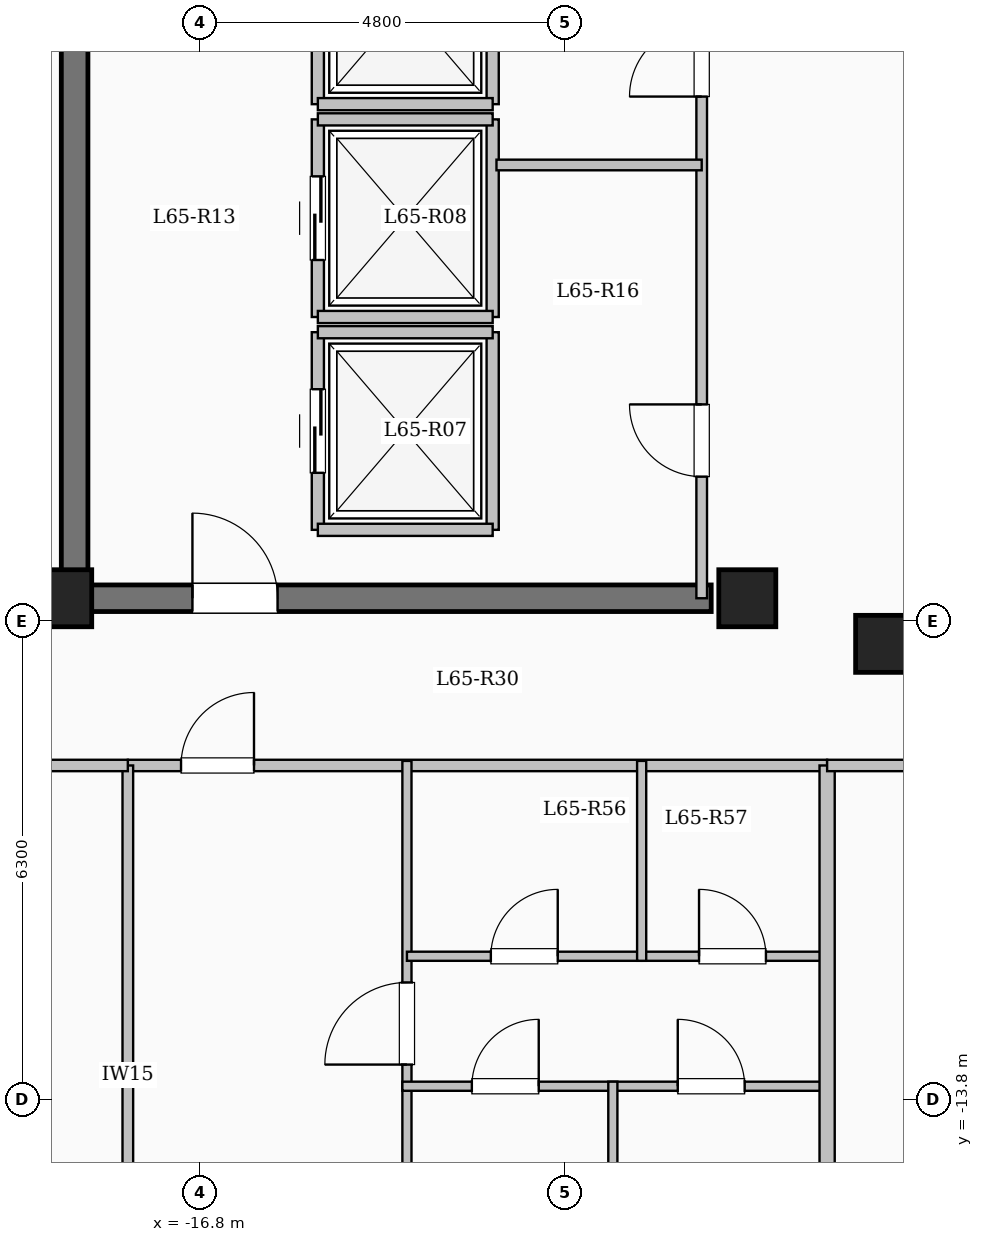
"""IFC4 building model, lengths in metres.
Left out: names, types, materials, properties, quantities, classifications, styles, units other than length and angle.
Written with IfcOpenShell. Run it as: python <this file> out.ifc"""

import sys

from ifc_helpers import new_model, si_unit, direction, frame, frame_2d, origin, origin_2d, place, context, subcontext, project, spatial, rectangle, extrude, element, fill, save


model = new_model("IFC4")
c1 = context("Model", 3, precision=1e-05, world=origin(), true_north=direction((0.0, 1.0)))
c2 = subcontext(c1, "Body", "Model", "MODEL_VIEW")
j1 = project(units=[si_unit("LENGTHUNIT", "METRE"), si_unit("PLANEANGLEUNIT", "RADIAN")], contexts=[c1])
p1 = place(None, origin())
s1 = spatial("IfcSite", under=j1, at=p1, CompositionType="ELEMENT")
p2 = place(p1, origin())
s2 = spatial("IfcBuilding", under=s1, at=p2, CompositionType="ELEMENT")
p3 = place(p2, frame((0.0, 0.0, 241.5)))
s3 = spatial("IfcBuildingStorey", under=s2, at=p3, CompositionType="ELEMENT", Elevation=241.5)
for number, where, z_axis, x_axis in (
    (1, (-7.8, -7.8, 0.0), (0.0, 0.0, 1.0), (1.0, 0.0, 0.0)),
    (2, (-9.6, -7.2, 0.0), (0.0, 0.0, 1.0), (1.0, 0.0, 0.0)),
    (3, (-18.6, -7.2, 0.0), (0.0, 0.0, 1.0), (1.0, 0.0, 0.0)),
):
    element("IfcColumn", number, at=place(p3, frame(where, z_axis=z_axis, x_axis=x_axis)), inside=s3, PredefinedType="COLUMN", context=c2, shape_type="SweptSolid", body=[
        extrude(rectangle(XDim=0.75, YDim=0.75, at=origin_2d()), origin(), (0.0, 0.0, 1.0), 3.35),
    ])
p4 = place(p3, frame((-15.25, -6.3, 0.0), z_axis=(0.0, 0.0, 1.0), x_axis=(0.0, 1.0, 0.0)))
e4 = element("IfcWall", 4, at=p4, inside=s3, PredefinedType="SOLIDWALL", context=c2, shape_type="SweptSolid", body=[
    extrude(rectangle(XDim=2.6, YDim=0.16, at=frame_2d((1.3, 0.0))), origin(), (0.0, 0.0, 1.0), 3.1),
])
p5 = place(p4, frame((0.75, 0.0, 0.0)))
e5 = element("IfcOpeningElement", 5, at=p5, cuts=e4, PredefinedType="OPENING", context=c2, shape_type="SweptSolid", body=[
    extrude(rectangle(XDim=1.1, YDim=2.15, at=frame_2d((0.55, 1.075))), frame((0.0, 0.09, 0.0), z_axis=(0.0, -1.0, 0.0), x_axis=(1.0, 0.0, 0.0)), (0.0, 0.0, 1.0), 0.18),
])
p6 = place(p3, frame((-12.95, -6.3, 0.0), z_axis=(0.0, 0.0, 1.0), x_axis=(0.0, 1.0, 0.0)))
e6 = element("IfcWall", 6, at=p6, inside=s3, PredefinedType="SOLIDWALL", context=c2, shape_type="SweptSolid", body=[
    extrude(rectangle(XDim=2.6, YDim=0.16, at=frame_2d((1.3, 0.0))), origin(), (0.0, 0.0, 1.0), 3.1),
])
for number, where, z_axis, x_axis in (
    (7, (-15.25, -6.3, 0.0), (0.0, 0.0, 1.0), (1.0, 0.0, 0.0)),
    (8, (-15.25, -3.7, 0.0), (0.0, 0.0, 1.0), (1.0, 0.0, 0.0)),
):
    element("IfcWall", number, at=place(p3, frame(where, z_axis=z_axis, x_axis=x_axis)), inside=s3, PredefinedType="SOLIDWALL", context=c2, shape_type="SweptSolid", body=[
        extrude(rectangle(XDim=2.3, YDim=0.16, at=frame_2d((1.15, 0.0))), origin(), (0.0, 0.0, 1.0), 3.1),
    ])
p7 = place(p3, frame((-15.25, -3.5, 0.0), z_axis=(0.0, 0.0, 1.0), x_axis=(0.0, 1.0, 0.0)))
e9 = element("IfcWall", 9, at=p7, inside=s3, PredefinedType="SOLIDWALL", context=c2, shape_type="SweptSolid", body=[
    extrude(rectangle(XDim=2.6, YDim=0.16, at=frame_2d((1.3, 0.0))), origin(), (0.0, 0.0, 1.0), 3.1),
])
p8 = place(p7, frame((0.75, 0.0, 0.0)))
e10 = element("IfcOpeningElement", 10, at=p8, cuts=e9, PredefinedType="OPENING", context=c2, shape_type="SweptSolid", body=[
    extrude(rectangle(XDim=1.1, YDim=2.15, at=frame_2d((0.55, 1.075))), frame((0.0, 0.09, 0.0), z_axis=(0.0, -1.0, 0.0), x_axis=(1.0, 0.0, 0.0)), (0.0, 0.0, 1.0), 0.18),
])
p9 = place(p3, frame((-12.95, -3.5, 0.0), z_axis=(0.0, 0.0, 1.0), x_axis=(0.0, 1.0, 0.0)))
e11 = element("IfcWall", 11, at=p9, inside=s3, PredefinedType="SOLIDWALL", context=c2, shape_type="SweptSolid", body=[
    extrude(rectangle(XDim=2.6, YDim=0.16, at=frame_2d((1.3, 0.0))), origin(), (0.0, 0.0, 1.0), 3.1),
])
for number, where, z_axis, x_axis in (
    (12, (-15.25, -3.5, 0.0), (0.0, 0.0, 1.0), (1.0, 0.0, 0.0)),
    (13, (-15.25, -0.9, 0.0), (0.0, 0.0, 1.0), (1.0, 0.0, 0.0)),
):
    element("IfcWall", number, at=place(p3, frame(where, z_axis=z_axis, x_axis=x_axis)), inside=s3, PredefinedType="SOLIDWALL", context=c2, shape_type="SweptSolid", body=[
        extrude(rectangle(XDim=2.3, YDim=0.16, at=frame_2d((1.15, 0.0))), origin(), (0.0, 0.0, 1.0), 3.1),
    ])
p10 = place(p3, frame((-15.25, -0.7, 0.0), z_axis=(0.0, 0.0, 1.0), x_axis=(0.0, 1.0, 0.0)))
e14 = element("IfcWall", 14, at=p10, inside=s3, PredefinedType="SOLIDWALL", context=c2, shape_type="SweptSolid", body=[
    extrude(rectangle(XDim=2.6, YDim=0.16, at=frame_2d((1.3, 0.0))), origin(), (0.0, 0.0, 1.0), 3.1),
])
p11 = place(p10, frame((0.75, 0.0, 0.0)))
e15 = element("IfcOpeningElement", 15, at=p11, cuts=e14, PredefinedType="OPENING", context=c2, shape_type="SweptSolid", body=[
    extrude(rectangle(XDim=1.1, YDim=2.15, at=frame_2d((0.55, 1.075))), frame((0.0, 0.09, 0.0), z_axis=(0.0, -1.0, 0.0), x_axis=(1.0, 0.0, 0.0)), (0.0, 0.0, 1.0), 0.18),
])
p12 = place(p3, frame((-12.95, -0.7, 0.0), z_axis=(0.0, 0.0, 1.0), x_axis=(0.0, 1.0, 0.0)))
e16 = element("IfcWall", 16, at=p12, inside=s3, PredefinedType="SOLIDWALL", context=c2, shape_type="SweptSolid", body=[
    extrude(rectangle(XDim=2.6, YDim=0.16, at=frame_2d((1.3, 0.0))), origin(), (0.0, 0.0, 1.0), 3.1),
])
p13 = place(p3, frame((-15.25, -0.7, 0.0), z_axis=(0.0, 0.0, 1.0), x_axis=(1.0, 0.0, 0.0)))
e17 = element("IfcWall", 17, at=p13, inside=s3, PredefinedType="SOLIDWALL", context=c2, shape_type="SweptSolid", body=[
    extrude(rectangle(XDim=2.3, YDim=0.16, at=frame_2d((1.15, 0.0))), origin(), (0.0, 0.0, 1.0), 3.1),
])
p14 = place(p3, frame((-18.45, -7.375, 0.0), z_axis=(0.0, 0.0, 1.0), x_axis=(0.0, 1.0, 0.0)))
e18 = element("IfcWall", 18, at=p14, inside=s3, PredefinedType="SHEAR", context=c2, shape_type="SweptSolid", body=[
    extrude(rectangle(XDim=14.05, YDim=0.35, at=frame_2d((7.025, 0.0))), origin(), (0.0, 0.0, 1.0), 3.35),
])
p15 = place(p3, frame((-18.625, -7.2, 0.0), z_axis=(0.0, 0.0, 1.0), x_axis=(1.0, 0.0, 0.0)))
e19 = element("IfcWall", 19, at=p15, inside=s3, PredefinedType="SHEAR", context=c2, shape_type="SweptSolid", body=[
    extrude(rectangle(XDim=8.55, YDim=0.35, at=frame_2d((4.275, 0.0))), origin(), (0.0, 0.0, 1.0), 3.35),
])
p16 = place(p15, frame((1.725, 0.0, 0.0)))
e20 = element("IfcOpeningElement", 20, at=p16, cuts=e19, PredefinedType="OPENING", context=c2, shape_type="SweptSolid", body=[
    extrude(rectangle(XDim=1.12, YDim=2.15, at=frame_2d((0.56, 1.075))), frame((0.0, 0.185, 0.0), z_axis=(0.0, -1.0, 0.0), x_axis=(1.0, 0.0, 0.0)), (0.0, 0.0, 1.0), 0.37),
])
p17 = place(p3, frame((-10.2, -7.2, 0.0), z_axis=(0.0, 0.0, 1.0), x_axis=(0.0, 1.0, 0.0)))
e21 = element("IfcWall", 21, at=p17, inside=s3, PredefinedType="PARTITIONING", context=c2, shape_type="SweptSolid", body=[
    extrude(rectangle(XDim=9.12, YDim=0.14, at=frame_2d((4.56, 0.0))), origin(), (0.0, 0.0, 1.0), 3.1),
])
p18 = place(p17, frame((1.6, 0.0, 0.0)))
e22 = element("IfcOpeningElement", 22, at=p18, cuts=e21, PredefinedType="OPENING", context=c2, shape_type="SweptSolid", body=[
    extrude(rectangle(XDim=0.95, YDim=2.12, at=frame_2d((0.475, 1.06))), frame((0.0, 0.08, 0.0), z_axis=(0.0, -1.0, 0.0), x_axis=(1.0, 0.0, 0.0)), (0.0, 0.0, 1.0), 0.16),
])
p19 = place(p17, frame((6.6, 0.0, 0.0)))
e23 = element("IfcOpeningElement", 23, at=p19, cuts=e21, PredefinedType="OPENING", context=c2, shape_type="SweptSolid", body=[
    extrude(rectangle(XDim=0.95, YDim=2.12, at=frame_2d((0.475, 1.06))), frame((0.0, 0.08, 0.0), z_axis=(0.0, -1.0, 0.0), x_axis=(1.0, 0.0, 0.0)), (0.0, 0.0, 1.0), 0.16),
])
p20 = place(p3, frame((-12.9, -1.5, 0.0), z_axis=(0.0, 0.0, 1.0), x_axis=(1.0, 0.0, 0.0)))
e24 = element("IfcWall", 24, at=p20, inside=s3, PredefinedType="PARTITIONING", context=c2, shape_type="SweptSolid", body=[
    extrude(rectangle(XDim=2.7, YDim=0.14, at=frame_2d((1.35, 0.0))), origin(), (0.0, 0.0, 1.0), 3.1),
])
p21 = place(p3, frame((-17.75, -9.4, 0.0), z_axis=(0.0, 0.0, 1.0), x_axis=(1.0, 0.0, 0.0)))
e25 = element("IfcWall", 25, at=p21, inside=s3, PredefinedType="PARTITIONING", context=c2, shape_type="SweptSolid", body=[
    extrude(rectangle(XDim=9.2, YDim=0.15, at=frame_2d((4.6, 0.0))), origin(), (0.0, 0.0, 1.0), 3.1),
])
p22 = place(p21, frame((0.7, 0.0, 0.0)))
e26 = element("IfcOpeningElement", 26, at=p22, cuts=e25, PredefinedType="OPENING", context=c2, shape_type="SweptSolid", body=[
    extrude(rectangle(XDim=0.96, YDim=2.15, at=frame_2d((0.48, 1.075))), frame((0.0, 0.085, 0.0), z_axis=(0.0, -1.0, 0.0), x_axis=(1.0, 0.0, 0.0)), (0.0, 0.0, 1.0), 0.17),
])
p23 = place(p3, frame((-14.078, -20.9, 0.0), z_axis=(0.0, 0.0, 1.0), x_axis=(0.0, 1.0, 0.0)))
e27 = element("IfcWall", 27, at=p23, inside=s3, PredefinedType="PARTITIONING", context=c2, shape_type="SweptSolid", body=[
    extrude(rectangle(XDim=11.56, YDim=0.12, at=frame_2d((5.78, 0.0))), origin(), (0.0, 0.0, 1.0), 3.1),
])
p24 = place(p23, frame((7.565, 0.0, 0.0)))
e28 = element("IfcOpeningElement", 28, at=p24, cuts=e27, PredefinedType="OPENING", context=c2, shape_type="SweptSolid", body=[
    extrude(rectangle(XDim=1.08, YDim=2.15, at=frame_2d((0.54, 1.075))), frame((0.0, 0.07, 0.0), z_axis=(0.0, -1.0, 0.0), x_axis=(1.0, 0.0, 0.0)), (0.0, 0.0, 1.0), 0.14),
])
p25 = place(p3, frame((-14.078, -11.91, 0.0), z_axis=(0.0, 0.0, 1.0), x_axis=(1.0, 0.0, 0.0)))
e29 = element("IfcWall", 29, at=p25, inside=s3, PredefinedType="PARTITIONING", context=c2, shape_type="SweptSolid", body=[
    extrude(rectangle(XDim=3.088, YDim=0.12, at=frame_2d((1.544, 0.0))), origin(), (0.0, 0.0, 1.0), 3.1),
])
p26 = place(p25, frame((1.104, 0.0, 0.0)))
e30 = element("IfcOpeningElement", 30, at=p26, cuts=e29, PredefinedType="OPENING", context=c2, shape_type="SweptSolid", body=[
    extrude(rectangle(XDim=0.88, YDim=2.1, at=frame_2d((0.44, 1.05))), frame((0.0, 0.07, 0.0), z_axis=(0.0, -1.0, 0.0), x_axis=(1.0, 0.0, 0.0)), (0.0, 0.0, 1.0), 0.14),
])
p27 = place(p3, frame((-10.99, -11.91, 0.0), z_axis=(0.0, 0.0, 1.0), x_axis=(1.0, 0.0, 0.0)))
e31 = element("IfcWall", 31, at=p27, inside=s3, PredefinedType="PARTITIONING", context=c2, shape_type="SweptSolid", body=[
    extrude(rectangle(XDim=2.39, YDim=0.12, at=frame_2d((1.195, 0.0))), origin(), (0.0, 0.0, 1.0), 3.1),
])
p28 = place(p27, frame((0.755, 0.0, 0.0)))
e32 = element("IfcOpeningElement", 32, at=p28, cuts=e31, PredefinedType="OPENING", context=c2, shape_type="SweptSolid", body=[
    extrude(rectangle(XDim=0.88, YDim=2.1, at=frame_2d((0.44, 1.05))), frame((0.0, 0.07, 0.0), z_axis=(0.0, -1.0, 0.0), x_axis=(1.0, 0.0, 0.0)), (0.0, 0.0, 1.0), 0.14),
])
p29 = place(p3, frame((-14.138, -13.62, 0.0), z_axis=(0.0, 0.0, 1.0), x_axis=(1.0, 0.0, 0.0)))
e33 = element("IfcWall", 33, at=p29, inside=s3, PredefinedType="PARTITIONING", context=c2, shape_type="SweptSolid", body=[
    extrude(rectangle(XDim=5.598, YDim=0.12, at=frame_2d((2.799, 0.0))), origin(), (0.0, 0.0, 1.0), 3.1),
])
p30 = place(p29, frame((0.914, 0.0, 0.0)))
e34 = element("IfcOpeningElement", 34, at=p30, cuts=e33, PredefinedType="OPENING", context=c2, shape_type="SweptSolid", body=[
    extrude(rectangle(XDim=0.88, YDim=2.1, at=frame_2d((0.44, 1.05))), frame((0.0, 0.07, 0.0), z_axis=(0.0, -1.0, 0.0), x_axis=(1.0, 0.0, 0.0)), (0.0, 0.0, 1.0), 0.14),
])
p31 = place(p29, frame((3.623, 0.0, 0.0)))
e35 = element("IfcOpeningElement", 35, at=p31, cuts=e33, PredefinedType="OPENING", context=c2, shape_type="SweptSolid", body=[
    extrude(rectangle(XDim=0.88, YDim=2.1, at=frame_2d((0.44, 1.05))), frame((0.0, 0.07, 0.0), z_axis=(0.0, -1.0, 0.0), x_axis=(1.0, 0.0, 0.0)), (0.0, 0.0, 1.0), 0.14),
])
p32 = place(p3, frame((-10.99, -11.97, 0.0), z_axis=(0.0, 0.0, 1.0), x_axis=(0.0, 1.0, 0.0)))
e36 = element("IfcWall", 36, at=p32, inside=s3, PredefinedType="PARTITIONING", context=c2, shape_type="SweptSolid", body=[
    extrude(rectangle(XDim=2.63, YDim=0.12, at=frame_2d((1.315, 0.0))), origin(), (0.0, 0.0, 1.0), 3.1),
])
p33 = place(p3, frame((-11.369, -20.9, 0.0), z_axis=(0.0, 0.0, 1.0), x_axis=(0.0, 1.0, 0.0)))
e37 = element("IfcWall", 37, at=p33, inside=s3, PredefinedType="PARTITIONING", context=c2, shape_type="SweptSolid", body=[
    extrude(rectangle(XDim=7.34, YDim=0.12, at=frame_2d((3.67, 0.0))), origin(), (0.0, 0.0, 1.0), 3.1),
])
p34 = place(p3, frame((-8.55, -21.504, 0.0), z_axis=(0.0, 0.0, 1.0), x_axis=(0.0, 1.0, 0.0)))
e38 = element("IfcWall", 38, at=p34, inside=s3, PredefinedType="SOLIDWALL", context=c2, shape_type="SweptSolid", body=[
    extrude(rectangle(XDim=12.104, YDim=0.2, at=frame_2d((6.052, 0.0))), origin(), (0.0, 0.0, 1.0), 3.1),
])
p35 = place(p3, frame((-8.55, -9.4, 0.0), z_axis=(0.0, 0.0, 1.0), x_axis=(1.0, 0.0, 0.0)))
e39 = element("IfcWall", 39, at=p35, inside=s3, PredefinedType="PARTITIONING", context=c2, shape_type="SweptSolid", body=[
    extrude(rectangle(XDim=17.1, YDim=0.15, at=frame_2d((8.55, 0.0))), origin(), (0.0, 0.0, 1.0), 3.1),
])
p36 = place(p35, frame((1.75, 0.0, 0.0)))
e40 = element("IfcOpeningElement", 40, at=p36, cuts=e39, PredefinedType="OPENING", context=c2, shape_type="SweptSolid", body=[
    extrude(rectangle(XDim=0.96, YDim=2.15, at=frame_2d((0.48, 1.075))), frame((0.0, 0.085, 0.0), z_axis=(0.0, -1.0, 0.0), x_axis=(1.0, 0.0, 0.0)), (0.0, 0.0, 1.0), 0.17),
])
p37 = place(p3, frame((-22.68, -7.25, 0.0), z_axis=(0.0, 0.0, 1.0), x_axis=(1.0, 0.0, 0.0)))
e41 = element("IfcWall", 41, at=p37, inside=s3, PredefinedType="PARTITIONING", context=c2, shape_type="SweptSolid", body=[
    extrude(rectangle(XDim=4.23, YDim=0.15, at=frame_2d((2.115, 0.0))), origin(), (0.0, 0.0, 1.0), 3.1),
])
p38 = place(p37, frame((1.73, 0.0, 0.0)))
e42 = element("IfcOpeningElement", 42, at=p38, cuts=e41, PredefinedType="OPENING", context=c2, shape_type="SweptSolid", body=[
    extrude(rectangle(XDim=0.96, YDim=2.15, at=frame_2d((0.48, 1.075))), frame((0.0, 0.085, 0.0), z_axis=(0.0, -1.0, 0.0), x_axis=(1.0, 0.0, 0.0)), (0.0, 0.0, 1.0), 0.17),
])
p39 = place(p3, frame((-17.75, -17.55, 0.0), z_axis=(0.0, 0.0, 1.0), x_axis=(0.0, 1.0, 0.0)))
e43 = element("IfcWall", 43, at=p39, inside=s3, PredefinedType="PARTITIONING", context=c2, shape_type="SweptSolid", body=[
    extrude(rectangle(XDim=8.15, YDim=0.14, at=frame_2d((4.075, 0.0))), origin(), (0.0, 0.0, 1.0), 3.1),
])
p40 = place(p3, frame((-22.68, -9.4, 0.0), z_axis=(0.0, 0.0, 1.0), x_axis=(1.0, 0.0, 0.0)))
e44 = element("IfcWall", 44, at=p40, inside=s3, PredefinedType="PARTITIONING", context=c2, shape_type="SweptSolid", body=[
    extrude(rectangle(XDim=4.93, YDim=0.15, at=frame_2d((2.465, 0.0))), origin(), (0.0, 0.0, 1.0), 3.1),
])
p41 = place(p40, frame((1.99, 0.0, 0.0)))
e45 = element("IfcOpeningElement", 45, at=p41, cuts=e44, PredefinedType="OPENING", context=c2, shape_type="SweptSolid", body=[
    extrude(rectangle(XDim=0.95, YDim=2.15, at=frame_2d((0.475, 1.075))), frame((0.0, 0.085, 0.0), z_axis=(0.0, -1.0, 0.0), x_axis=(1.0, 0.0, 0.0)), (0.0, 0.0, 1.0), 0.17),
])
p42 = place(p5, origin())
e46 = element("IfcDoor", 46, at=p42, inside=s3, OperationType="SLIDING_TO_LEFT", PredefinedType="DOOR", context=c2, shape_type="SweptSolid", body=[
    extrude(rectangle(XDim=1.1, YDim=2.15, at=frame_2d((0.55, 1.075))), frame((0.0, 0.025, 0.0), z_axis=(0.0, -1.0, 0.0), x_axis=(1.0, 0.0, 0.0)), (0.0, 0.0, 1.0), 0.05),
])
fill(e5, e46)
p43 = place(p8, origin())
e47 = element("IfcDoor", 47, at=p43, inside=s3, OperationType="SLIDING_TO_LEFT", PredefinedType="DOOR", context=c2, shape_type="SweptSolid", body=[
    extrude(rectangle(XDim=1.1, YDim=2.15, at=frame_2d((0.55, 1.075))), frame((0.0, 0.025, 0.0), z_axis=(0.0, -1.0, 0.0), x_axis=(1.0, 0.0, 0.0)), (0.0, 0.0, 1.0), 0.05),
])
fill(e10, e47)
p44 = place(p16, origin())
e48 = element("IfcDoor", 48, at=p44, inside=s3, OperationType="SINGLE_SWING_LEFT", PredefinedType="DOOR", context=c2, shape_type="SweptSolid", body=[
    extrude(rectangle(XDim=1.12, YDim=2.15, at=frame_2d((0.56, 1.075))), frame((0.0, 0.025, 0.0), z_axis=(0.0, -1.0, 0.0), x_axis=(1.0, 0.0, 0.0)), (0.0, 0.0, 1.0), 0.05),
])
fill(e20, e48)
p45 = place(p18, origin())
e49 = element("IfcDoor", 49, at=p45, inside=s3, OperationType="SINGLE_SWING_RIGHT", PredefinedType="DOOR", context=c2, shape_type="SweptSolid", body=[
    extrude(rectangle(XDim=0.95, YDim=2.12, at=frame_2d((0.475, 1.06))), frame((0.0, 0.025, 0.0), z_axis=(0.0, -1.0, 0.0), x_axis=(1.0, 0.0, 0.0)), (0.0, 0.0, 1.0), 0.05),
])
fill(e22, e49)
p46 = place(p19, origin())
e50 = element("IfcDoor", 50, at=p46, inside=s3, OperationType="SINGLE_SWING_LEFT", PredefinedType="DOOR", context=c2, shape_type="SweptSolid", body=[
    extrude(rectangle(XDim=0.95, YDim=2.12, at=frame_2d((0.475, 1.06))), frame((0.0, 0.025, 0.0), z_axis=(0.0, -1.0, 0.0), x_axis=(1.0, 0.0, 0.0)), (0.0, 0.0, 1.0), 0.05),
])
fill(e23, e50)
p47 = place(p22, origin())
e51 = element("IfcDoor", 51, at=p47, inside=s3, OperationType="SINGLE_SWING_RIGHT", PredefinedType="DOOR", context=c2, shape_type="SweptSolid", body=[
    extrude(rectangle(XDim=0.96, YDim=2.15, at=frame_2d((0.48, 1.075))), frame((0.0, 0.025, 0.0), z_axis=(0.0, -1.0, 0.0), x_axis=(1.0, 0.0, 0.0)), (0.0, 0.0, 1.0), 0.05),
])
fill(e26, e51)
p48 = place(p24, origin())
e52 = element("IfcDoor", 52, at=p48, inside=s3, OperationType="SINGLE_SWING_LEFT", PredefinedType="DOOR", context=c2, shape_type="SweptSolid", body=[
    extrude(rectangle(XDim=1.08, YDim=2.15, at=frame_2d((0.54, 1.075))), frame((0.0, 0.025, 0.0), z_axis=(0.0, -1.0, 0.0), x_axis=(1.0, 0.0, 0.0)), (0.0, 0.0, 1.0), 0.05),
])
fill(e28, e52)
p49 = place(p26, origin())
e53 = element("IfcDoor", 53, at=p49, inside=s3, OperationType="SINGLE_SWING_RIGHT", PredefinedType="DOOR", context=c2, shape_type="SweptSolid", body=[
    extrude(rectangle(XDim=0.88, YDim=2.1, at=frame_2d((0.44, 1.05))), frame((0.0, 0.025, 0.0), z_axis=(0.0, -1.0, 0.0), x_axis=(1.0, 0.0, 0.0)), (0.0, 0.0, 1.0), 0.05),
])
fill(e30, e53)
p50 = place(p28, origin())
e54 = element("IfcDoor", 54, at=p50, inside=s3, OperationType="SINGLE_SWING_LEFT", PredefinedType="DOOR", context=c2, shape_type="SweptSolid", body=[
    extrude(rectangle(XDim=0.88, YDim=2.1, at=frame_2d((0.44, 1.05))), frame((0.0, 0.025, 0.0), z_axis=(0.0, -1.0, 0.0), x_axis=(1.0, 0.0, 0.0)), (0.0, 0.0, 1.0), 0.05),
])
fill(e32, e54)
p51 = place(p30, origin())
e55 = element("IfcDoor", 55, at=p51, inside=s3, OperationType="SINGLE_SWING_RIGHT", PredefinedType="DOOR", context=c2, shape_type="SweptSolid", body=[
    extrude(rectangle(XDim=0.88, YDim=2.1, at=frame_2d((0.44, 1.05))), frame((0.0, 0.025, 0.0), z_axis=(0.0, -1.0, 0.0), x_axis=(1.0, 0.0, 0.0)), (0.0, 0.0, 1.0), 0.05),
])
fill(e34, e55)
p52 = place(p31, origin())
e56 = element("IfcDoor", 56, at=p52, inside=s3, OperationType="SINGLE_SWING_LEFT", PredefinedType="DOOR", context=c2, shape_type="SweptSolid", body=[
    extrude(rectangle(XDim=0.88, YDim=2.1, at=frame_2d((0.44, 1.05))), frame((0.0, 0.025, 0.0), z_axis=(0.0, -1.0, 0.0), x_axis=(1.0, 0.0, 0.0)), (0.0, 0.0, 1.0), 0.05),
])
fill(e35, e56)
save(model, sys.argv[1])
